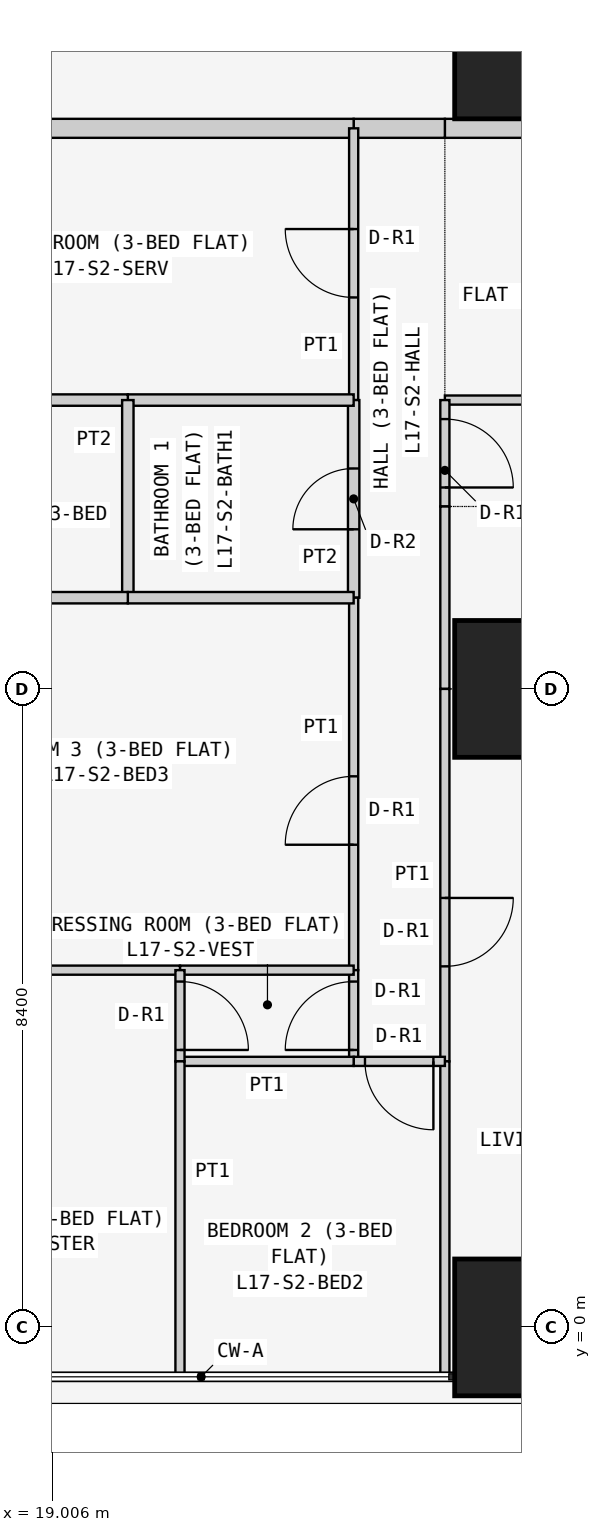
"""IFC4 building model, lengths in metres.
Left out: names, types, materials, properties, quantities, classifications, styles, units other than length and angle.
Written with IfcOpenShell. Run it as: python <this file> out.ifc"""

import sys

from ifc_helpers import new_model, si_unit, direction, frame, frame_2d, origin, origin_2d, place, context, subcontext, project, spatial, rectangle, extrude, element, fill, save


model = new_model("IFC4")
c1 = context("Model", 3, precision=1e-05, world=origin(), true_north=direction((0.0, 1.0)))
c2 = subcontext(c1, "Body", "Model", "MODEL_VIEW")
j1 = project(units=[si_unit("LENGTHUNIT", "METRE"), si_unit("PLANEANGLEUNIT", "RADIAN")], contexts=[c1])
p1 = place(None, origin())
s1 = spatial("IfcSite", under=j1, at=p1, CompositionType="ELEMENT")
p2 = place(p1, origin())
s2 = spatial("IfcBuilding", under=s1, at=p2, CompositionType="ELEMENT")
p3 = place(p2, frame((0.0, 0.0, 70.5)))
s3 = spatial("IfcBuildingStorey", under=s2, at=p3, CompositionType="ELEMENT", Elevation=70.5)
for number, where, z_axis, x_axis in (
    (1, (25.2, 0.0, 0.0), (0.0, 0.0, 1.0), (1.0, 0.0, 0.0)),
    (2, (25.2, 8.4, 0.0), (0.0, 0.0, 1.0), (1.0, 0.0, 0.0)),
    (3, (25.2, 16.8, 0.0), (0.0, 0.0, 1.0), (1.0, 0.0, 0.0)),
):
    element("IfcColumn", number, at=place(p3, frame(where, z_axis=z_axis, x_axis=x_axis)), inside=s3, PredefinedType="COLUMN", context=c2, shape_type="SweptSolid", body=[
        extrude(rectangle(XDim=1.8, YDim=1.8, at=origin_2d()), origin(), (0.0, 0.0, 1.0), 3.6),
    ])
p4 = place(p3, frame((29.4, 15.775, 0.0), z_axis=(0.0, 0.0, 1.0), x_axis=(-1.0, 0.0, 0.0)))
e4 = element("IfcWall", 4, at=p4, inside=s3, PredefinedType="PARTITIONING", context=c2, shape_type="SweptSolid", body=[
    extrude(rectangle(XDim=5.229, YDim=0.25, at=frame_2d((2.615, 0.0))), origin(), (0.0, 0.0, 1.0), 3.45),
])
p5 = place(p4, frame((2.1, 0.0, 0.0)))
e5 = element("IfcOpeningElement", 5, at=p5, cuts=e4, PredefinedType="OPENING", context=c2, shape_type="SweptSolid", body=[
    extrude(rectangle(XDim=1.0, YDim=2.1, at=frame_2d((0.5, 1.05))), frame((0.0, 0.135, 0.0), z_axis=(0.0, -1.0, 0.0), x_axis=(1.0, 0.0, 0.0)), (0.0, 0.0, 1.0), 0.27),
])
p6 = place(p3, frame((24.171, 15.775, 0.0), z_axis=(0.0, 0.0, 1.0), x_axis=(-1.0, 0.0, 0.0)))
e6 = element("IfcWall", 6, at=p6, inside=s3, PredefinedType="PARTITIONING", context=c2, shape_type="SweptSolid", body=[
    extrude(rectangle(XDim=1.2, YDim=0.25, at=frame_2d((0.6, 0.0))), origin(), (0.0, 0.0, 1.0), 3.45),
])
p7 = place(p3, frame((22.971, 15.775, 0.0), z_axis=(0.0, 0.0, 1.0), x_axis=(-1.0, 0.0, 0.0)))
e7 = element("IfcWall", 7, at=p7, inside=s3, PredefinedType="PARTITIONING", context=c2, shape_type="SweptSolid", body=[
    extrude(rectangle(XDim=6.871, YDim=0.25, at=frame_2d((3.436, 0.0))), origin(), (0.0, 0.0, 1.0), 3.45),
])
p8 = place(p3, frame((29.4, 12.2, 0.0), z_axis=(0.0, 0.0, 1.0), x_axis=(-1.0, 0.0, 0.0)))
e8 = element("IfcWall", 8, at=p8, inside=s3, PredefinedType="PARTITIONING", context=c2, shape_type="SweptSolid", body=[
    extrude(rectangle(XDim=5.229, YDim=0.12, at=frame_2d((2.615, 0.0))), origin(), (0.0, 0.0, 1.0), 3.45),
])
p9 = place(p3, frame((24.171, 10.8, 0.0), z_axis=(0.0, 0.0, 1.0), x_axis=(0.0, 1.0, 0.0)))
e9 = element("IfcWall", 9, at=p9, inside=s3, PredefinedType="PARTITIONING", context=c2, shape_type="SweptSolid", body=[
    extrude(rectangle(XDim=1.4, YDim=0.12, at=frame_2d((0.7, 0.0))), origin(), (0.0, 0.0, 1.0), 3.45),
])
p10 = place(p9, frame((0.25, 0.0, 0.0)))
e10 = element("IfcOpeningElement", 10, at=p10, cuts=e9, PredefinedType="OPENING", context=c2, shape_type="SweptSolid", body=[
    extrude(rectangle(XDim=0.9, YDim=2.1, at=frame_2d((0.45, 1.05))), frame((0.0, 0.07, 0.0), z_axis=(0.0, -1.0, 0.0), x_axis=(1.0, 0.0, 0.0)), (0.0, 0.0, 1.0), 0.14),
])
p11 = place(p3, frame((24.171, 8.4, 0.0), z_axis=(0.0, 0.0, 1.0), x_axis=(0.0, 1.0, 0.0)))
e11 = element("IfcWall", 11, at=p11, inside=s3, PredefinedType="PARTITIONING", context=c2, shape_type="SweptSolid", body=[
    extrude(rectangle(XDim=2.4, YDim=0.12, at=frame_2d((1.2, 0.0))), origin(), (0.0, 0.0, 1.0), 3.45),
])
p12 = place(p3, frame((24.171, 3.5, 0.0), z_axis=(0.0, 0.0, 1.0), x_axis=(0.0, 1.0, 0.0)))
e12 = element("IfcWall", 12, at=p12, inside=s3, PredefinedType="PARTITIONING", context=c2, shape_type="SweptSolid", body=[
    extrude(rectangle(XDim=4.9, YDim=0.12, at=frame_2d((2.45, 0.0))), origin(), (0.0, 0.0, 1.0), 3.45),
])
p13 = place(p12, frame((1.25, 0.0, 0.0)))
e13 = element("IfcOpeningElement", 13, at=p13, cuts=e12, PredefinedType="OPENING", context=c2, shape_type="SweptSolid", body=[
    extrude(rectangle(XDim=0.9, YDim=2.1, at=frame_2d((0.45, 1.05))), frame((0.0, 0.07, 0.0), z_axis=(0.0, -1.0, 0.0), x_axis=(1.0, 0.0, 0.0)), (0.0, 0.0, 1.0), 0.14),
])
p14 = place(p3, frame((24.171, -0.65, 0.0), z_axis=(0.0, 0.0, 1.0), x_axis=(0.0, 1.0, 0.0)))
e14 = element("IfcWall", 14, at=p14, inside=s3, PredefinedType="PARTITIONING", context=c2, shape_type="SweptSolid", body=[
    extrude(rectangle(XDim=4.15, YDim=0.12, at=frame_2d((2.075, 0.0))), origin(), (0.0, 0.0, 1.0), 3.45),
])
p15 = place(p3, frame((22.971, 12.2, 0.0), z_axis=(0.0, 0.0, 1.0), x_axis=(0.0, 1.0, 0.0)))
e15 = element("IfcWall", 15, at=p15, inside=s3, PredefinedType="PARTITIONING", context=c2, shape_type="SweptSolid", body=[
    extrude(rectangle(XDim=3.575, YDim=0.12, at=frame_2d((1.788, 0.0))), origin(), (0.0, 0.0, 1.0), 3.45),
])
p16 = place(p15, frame((1.35, 0.0, 0.0)))
e16 = element("IfcOpeningElement", 16, at=p16, cuts=e15, PredefinedType="OPENING", context=c2, shape_type="SweptSolid", body=[
    extrude(rectangle(XDim=0.9, YDim=2.1, at=frame_2d((0.45, 1.05))), frame((0.0, 0.07, 0.0), z_axis=(0.0, -1.0, 0.0), x_axis=(1.0, 0.0, 0.0)), (0.0, 0.0, 1.0), 0.14),
])
p17 = place(p3, frame((22.971, 9.6, 0.0), z_axis=(0.0, 0.0, 1.0), x_axis=(0.0, 1.0, 0.0)))
e17 = element("IfcWall", 17, at=p17, inside=s3, PredefinedType="PARTITIONING", context=c2, shape_type="SweptSolid", body=[
    extrude(rectangle(XDim=2.6, YDim=0.15, at=frame_2d((1.3, 0.0))), origin(), (0.0, 0.0, 1.0), 3.45),
])
p18 = place(p17, frame((0.9, 0.0, 0.0)))
e18 = element("IfcOpeningElement", 18, at=p18, cuts=e17, PredefinedType="OPENING", context=c2, shape_type="SweptSolid", body=[
    extrude(rectangle(XDim=0.8, YDim=2.1, at=frame_2d((0.4, 1.05))), frame((0.0, 0.085, 0.0), z_axis=(0.0, -1.0, 0.0), x_axis=(1.0, 0.0, 0.0)), (0.0, 0.0, 1.0), 0.17),
])
p19 = place(p3, frame((22.971, 4.7, 0.0), z_axis=(0.0, 0.0, 1.0), x_axis=(0.0, 1.0, 0.0)))
e19 = element("IfcWall", 19, at=p19, inside=s3, PredefinedType="PARTITIONING", context=c2, shape_type="SweptSolid", body=[
    extrude(rectangle(XDim=4.9, YDim=0.12, at=frame_2d((2.45, 0.0))), origin(), (0.0, 0.0, 1.0), 3.45),
])
p20 = place(p19, frame((1.65, 0.0, 0.0)))
e20 = element("IfcOpeningElement", 20, at=p20, cuts=e19, PredefinedType="OPENING", context=c2, shape_type="SweptSolid", body=[
    extrude(rectangle(XDim=0.9, YDim=2.1, at=frame_2d((0.45, 1.05))), frame((0.0, 0.07, 0.0), z_axis=(0.0, -1.0, 0.0), x_axis=(1.0, 0.0, 0.0)), (0.0, 0.0, 1.0), 0.14),
])
p21 = place(p3, frame((22.971, 3.5, 0.0), z_axis=(0.0, 0.0, 1.0), x_axis=(0.0, 1.0, 0.0)))
e21 = element("IfcWall", 21, at=p21, inside=s3, PredefinedType="PARTITIONING", context=c2, shape_type="SweptSolid", body=[
    extrude(rectangle(XDim=1.2, YDim=0.12, at=frame_2d((0.6, 0.0))), origin(), (0.0, 0.0, 1.0), 3.45),
])
p22 = place(p21, frame((0.15, 0.0, 0.0)))
e22 = element("IfcOpeningElement", 22, at=p22, cuts=e21, PredefinedType="OPENING", context=c2, shape_type="SweptSolid", body=[
    extrude(rectangle(XDim=0.9, YDim=2.1, at=frame_2d((0.45, 1.05))), frame((0.0, 0.07, 0.0), z_axis=(0.0, -1.0, 0.0), x_axis=(1.0, 0.0, 0.0)), (0.0, 0.0, 1.0), 0.14),
])
p23 = place(p3, frame((24.171, 3.5, 0.0), z_axis=(0.0, 0.0, 1.0), x_axis=(-1.0, 0.0, 0.0)))
e23 = element("IfcWall", 23, at=p23, inside=s3, PredefinedType="PARTITIONING", context=c2, shape_type="SweptSolid", body=[
    extrude(rectangle(XDim=1.2, YDim=0.12, at=frame_2d((0.6, 0.0))), origin(), (0.0, 0.0, 1.0), 3.45),
])
p24 = place(p23, frame((0.151, 0.0, 0.0)))
e24 = element("IfcOpeningElement", 24, at=p24, cuts=e23, PredefinedType="OPENING", context=c2, shape_type="SweptSolid", body=[
    extrude(rectangle(XDim=0.9, YDim=2.1, at=frame_2d((0.45, 1.05))), frame((0.0, 0.07, 0.0), z_axis=(0.0, -1.0, 0.0), x_axis=(1.0, 0.0, 0.0)), (0.0, 0.0, 1.0), 0.14),
])
p25 = place(p3, frame((22.971, 12.2, 0.0), z_axis=(0.0, 0.0, 1.0), x_axis=(-1.0, 0.0, 0.0)))
e25 = element("IfcWall", 25, at=p25, inside=s3, PredefinedType="PARTITIONING", context=c2, shape_type="SweptSolid", body=[
    extrude(rectangle(XDim=2.971, YDim=0.15, at=frame_2d((1.485, 0.0))), origin(), (0.0, 0.0, 1.0), 3.45),
])
p26 = place(p3, frame((20.0, 12.2, 0.0), z_axis=(0.0, 0.0, 1.0), x_axis=(-1.0, 0.0, 0.0)))
e26 = element("IfcWall", 26, at=p26, inside=s3, PredefinedType="PARTITIONING", context=c2, shape_type="SweptSolid", body=[
    extrude(rectangle(XDim=3.9, YDim=0.15, at=frame_2d((1.95, 0.0))), origin(), (0.0, 0.0, 1.0), 3.45),
])
p27 = place(p26, frame((1.45, 0.0, 0.0)))
e27 = element("IfcOpeningElement", 27, at=p27, cuts=e26, PredefinedType="OPENING", context=c2, shape_type="SweptSolid", body=[
    extrude(rectangle(XDim=0.8, YDim=2.1, at=frame_2d((0.4, 1.05))), frame((0.0, 0.085, 0.0), z_axis=(0.0, -1.0, 0.0), x_axis=(1.0, 0.0, 0.0)), (0.0, 0.0, 1.0), 0.17),
])
p28 = place(p3, frame((20.0, 9.6, 0.0), z_axis=(0.0, 0.0, 1.0), x_axis=(0.0, 1.0, 0.0)))
e28 = element("IfcWall", 28, at=p28, inside=s3, PredefinedType="PARTITIONING", context=c2, shape_type="SweptSolid", body=[
    extrude(rectangle(XDim=2.6, YDim=0.15, at=frame_2d((1.3, 0.0))), origin(), (0.0, 0.0, 1.0), 3.45),
])
p29 = place(p3, frame((22.971, 9.6, 0.0), z_axis=(0.0, 0.0, 1.0), x_axis=(-1.0, 0.0, 0.0)))
e29 = element("IfcWall", 29, at=p29, inside=s3, PredefinedType="PARTITIONING", context=c2, shape_type="SweptSolid", body=[
    extrude(rectangle(XDim=2.971, YDim=0.15, at=frame_2d((1.485, 0.0))), origin(), (0.0, 0.0, 1.0), 3.45),
])
p30 = place(p3, frame((20.0, 9.6, 0.0), z_axis=(0.0, 0.0, 1.0), x_axis=(-1.0, 0.0, 0.0)))
e30 = element("IfcWall", 30, at=p30, inside=s3, PredefinedType="PARTITIONING", context=c2, shape_type="SweptSolid", body=[
    extrude(rectangle(XDim=3.9, YDim=0.15, at=frame_2d((1.95, 0.0))), origin(), (0.0, 0.0, 1.0), 3.45),
])
p31 = place(p3, frame((22.971, 4.7, 0.0), z_axis=(0.0, 0.0, 1.0), x_axis=(-1.0, 0.0, 0.0)))
e31 = element("IfcWall", 31, at=p31, inside=s3, PredefinedType="PARTITIONING", context=c2, shape_type="SweptSolid", body=[
    extrude(rectangle(XDim=2.285, YDim=0.12, at=frame_2d((1.143, 0.0))), origin(), (0.0, 0.0, 1.0), 3.45),
])
p32 = place(p3, frame((20.686, 4.7, 0.0), z_axis=(0.0, 0.0, 1.0), x_axis=(-1.0, 0.0, 0.0)))
e32 = element("IfcWall", 32, at=p32, inside=s3, PredefinedType="PARTITIONING", context=c2, shape_type="SweptSolid", body=[
    extrude(rectangle(XDim=4.586, YDim=0.12, at=frame_2d((2.293, 0.0))), origin(), (0.0, 0.0, 1.0), 3.45),
])
p33 = place(p3, frame((22.971, 3.5, 0.0), z_axis=(0.0, 0.0, 1.0), x_axis=(-1.0, 0.0, 0.0)))
e33 = element("IfcWall", 33, at=p33, inside=s3, PredefinedType="PARTITIONING", context=c2, shape_type="SweptSolid", body=[
    extrude(rectangle(XDim=2.285, YDim=0.12, at=frame_2d((1.143, 0.0))), origin(), (0.0, 0.0, 1.0), 3.45),
])
p34 = place(p3, frame((20.686, 3.5, 0.0), z_axis=(0.0, 0.0, 1.0), x_axis=(0.0, 1.0, 0.0)))
e34 = element("IfcWall", 34, at=p34, inside=s3, PredefinedType="PARTITIONING", context=c2, shape_type="SweptSolid", body=[
    extrude(rectangle(XDim=1.2, YDim=0.12, at=frame_2d((0.6, 0.0))), origin(), (0.0, 0.0, 1.0), 3.45),
])
p35 = place(p34, frame((0.15, 0.0, 0.0)))
e35 = element("IfcOpeningElement", 35, at=p35, cuts=e34, PredefinedType="OPENING", context=c2, shape_type="SweptSolid", body=[
    extrude(rectangle(XDim=0.9, YDim=2.1, at=frame_2d((0.45, 1.05))), frame((0.0, 0.07, 0.0), z_axis=(0.0, -1.0, 0.0), x_axis=(1.0, 0.0, 0.0)), (0.0, 0.0, 1.0), 0.14),
])
p36 = place(p3, frame((20.686, -0.65, 0.0), z_axis=(0.0, 0.0, 1.0), x_axis=(0.0, 1.0, 0.0)))
e36 = element("IfcWall", 36, at=p36, inside=s3, PredefinedType="PARTITIONING", context=c2, shape_type="SweptSolid", body=[
    extrude(rectangle(XDim=4.15, YDim=0.12, at=frame_2d((2.075, 0.0))), origin(), (0.0, 0.0, 1.0), 3.45),
])
p37 = place(p10, frame((0.9, 0.0, 0.0), z_axis=(0.0, 0.0, 1.0), x_axis=(-1.0, 0.0, 0.0)))
e37 = element("IfcDoor", 37, at=p37, inside=s3, OperationType="SINGLE_SWING_RIGHT", PredefinedType="DOOR", context=c2, shape_type="SweptSolid", body=[
    extrude(rectangle(XDim=0.9, YDim=2.1, at=frame_2d((0.45, 1.05))), frame((0.0, 0.025, 0.0), z_axis=(0.0, -1.0, 0.0), x_axis=(1.0, 0.0, 0.0)), (0.0, 0.0, 1.0), 0.05),
])
fill(e10, e37)
p38 = place(p13, frame((0.9, 0.0, 0.0), z_axis=(0.0, 0.0, 1.0), x_axis=(-1.0, 0.0, 0.0)))
e38 = element("IfcDoor", 38, at=p38, inside=s3, OperationType="SINGLE_SWING_LEFT", PredefinedType="DOOR", context=c2, shape_type="SweptSolid", body=[
    extrude(rectangle(XDim=0.9, YDim=2.1, at=frame_2d((0.45, 1.05))), frame((0.0, 0.025, 0.0), z_axis=(0.0, -1.0, 0.0), x_axis=(1.0, 0.0, 0.0)), (0.0, 0.0, 1.0), 0.05),
])
fill(e13, e38)
p39 = place(p16, origin())
e39 = element("IfcDoor", 39, at=p39, inside=s3, OperationType="SINGLE_SWING_RIGHT", PredefinedType="DOOR", context=c2, shape_type="SweptSolid", body=[
    extrude(rectangle(XDim=0.9, YDim=2.1, at=frame_2d((0.45, 1.05))), frame((0.0, 0.025, 0.0), z_axis=(0.0, -1.0, 0.0), x_axis=(1.0, 0.0, 0.0)), (0.0, 0.0, 1.0), 0.05),
])
fill(e16, e39)
p40 = place(p18, origin())
e40 = element("IfcDoor", 40, at=p40, inside=s3, OperationType="SINGLE_SWING_LEFT", PredefinedType="DOOR", context=c2, shape_type="SweptSolid", body=[
    extrude(rectangle(XDim=0.8, YDim=2.1, at=frame_2d((0.4, 1.05))), frame((0.0, 0.025, 0.0), z_axis=(0.0, -1.0, 0.0), x_axis=(1.0, 0.0, 0.0)), (0.0, 0.0, 1.0), 0.05),
])
fill(e18, e40)
p41 = place(p20, origin())
e41 = element("IfcDoor", 41, at=p41, inside=s3, OperationType="SINGLE_SWING_LEFT", PredefinedType="DOOR", context=c2, shape_type="SweptSolid", body=[
    extrude(rectangle(XDim=0.9, YDim=2.1, at=frame_2d((0.45, 1.05))), frame((0.0, 0.025, 0.0), z_axis=(0.0, -1.0, 0.0), x_axis=(1.0, 0.0, 0.0)), (0.0, 0.0, 1.0), 0.05),
])
fill(e20, e41)
p42 = place(p22, origin())
e42 = element("IfcDoor", 42, at=p42, inside=s3, OperationType="SINGLE_SWING_LEFT", PredefinedType="DOOR", context=c2, shape_type="SweptSolid", body=[
    extrude(rectangle(XDim=0.9, YDim=2.1, at=frame_2d((0.45, 1.05))), frame((0.0, 0.025, 0.0), z_axis=(0.0, -1.0, 0.0), x_axis=(1.0, 0.0, 0.0)), (0.0, 0.0, 1.0), 0.05),
])
fill(e22, e42)
p43 = place(p35, frame((0.9, 0.0, 0.0), z_axis=(0.0, 0.0, 1.0), x_axis=(-1.0, 0.0, 0.0)))
e43 = element("IfcDoor", 43, at=p43, inside=s3, OperationType="SINGLE_SWING_RIGHT", PredefinedType="DOOR", context=c2, shape_type="SweptSolid", body=[
    extrude(rectangle(XDim=0.9, YDim=2.1, at=frame_2d((0.45, 1.05))), frame((0.0, 0.025, 0.0), z_axis=(0.0, -1.0, 0.0), x_axis=(1.0, 0.0, 0.0)), (0.0, 0.0, 1.0), 0.05),
])
fill(e35, e43)
p44 = place(p24, origin())
e44 = element("IfcDoor", 44, at=p44, inside=s3, OperationType="SINGLE_SWING_LEFT", PredefinedType="DOOR", context=c2, shape_type="SweptSolid", body=[
    extrude(rectangle(XDim=0.9, YDim=2.1, at=frame_2d((0.45, 1.05))), frame((0.0, 0.025, 0.0), z_axis=(0.0, -1.0, 0.0), x_axis=(1.0, 0.0, 0.0)), (0.0, 0.0, 1.0), 0.05),
])
fill(e24, e44)
save(model, sys.argv[1])
